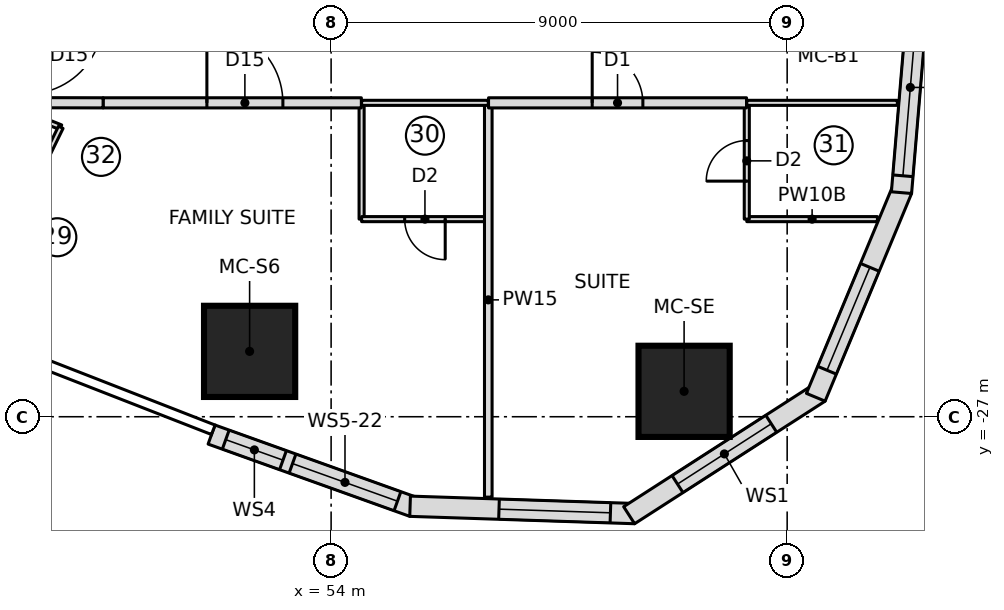
"""IFC4 building model, lengths in metres.
Left out: names, types, materials, properties, quantities, classifications, styles, units other than length and angle.
Written with IfcOpenShell. Run it as: python <this file> out.ifc"""

import sys

from ifc_helpers import new_model, si_unit, direction, frame, frame_2d, origin, origin_2d, place, context, subcontext, project, spatial, polyline, rectangle, outline, extrude, element, fill, save


model = new_model("IFC4")
c1 = context("Model", 3, precision=1e-05, world=origin(), true_north=direction((0.0, 1.0)))
c2 = subcontext(c1, "Body", "Model", "MODEL_VIEW")
j1 = project(units=[si_unit("LENGTHUNIT", "METRE"), si_unit("PLANEANGLEUNIT", "RADIAN")], contexts=[c1])
p1 = place(None, origin())
s1 = spatial("IfcSite", under=j1, at=p1, CompositionType="ELEMENT")
p2 = place(p1, origin())
s2 = spatial("IfcBuilding", under=s1, at=p2, CompositionType="ELEMENT")
p3 = place(p2, frame((0.0, 0.0, 50.25)))
s3 = spatial("IfcBuildingStorey", under=s2, at=p3, CompositionType="ELEMENT", Elevation=50.25)
for number, where, z_axis, x_axis in (
    (1, (52.392, -25.71, 0.0), (0.0, 0.0, 1.0), (1.0, 0.0, 0.0)),
    (2, (60.966, -26.499, 0.0), (0.0, 0.0, 1.0), (1.0, 0.0, 0.0)),
):
    element("IfcColumn", number, at=place(p3, frame(where, z_axis=z_axis, x_axis=x_axis)), inside=s3, PredefinedType="COLUMN", context=c2, shape_type="SweptSolid", body=[
        extrude(rectangle(XDim=1.8, YDim=1.8, at=origin_2d()), origin(), (0.0, 0.0, 1.0), 3.55),
    ])
p4 = place(p3, frame((51.64, -27.352, 0.0), z_axis=(0.0, 0.0, 1.0), x_axis=(0.941339752885, -0.337460323057, 0.0)))
e3 = element("IfcWall", 3, at=p4, inside=s3, PredefinedType="NOTDEFINED", context=c2, shape_type="SweptSolid", body=[
    extrude(outline(polyline([(0.0, -0.2), (4.228, -0.2), (4.165, 0.2), (0.0, 0.2), (0.0, -0.2)])), origin(), (0.0, 0.0, 1.0), 3.25),
])
p5 = place(p4, frame((0.298, 0.0, 0.9)))
e4 = element("IfcOpeningElement", 4, at=p5, cuts=e3, PredefinedType="OPENING", context=c2, shape_type="SweptSolid", body=[
    extrude(rectangle(XDim=1.2, YDim=1.8, at=frame_2d((0.6, 0.9))), frame((0.0, 0.21, 0.0), z_axis=(0.0, -1.0, 0.0), x_axis=(1.0, 0.0, 0.0)), (0.0, 0.0, 1.0), 0.42),
])
p6 = place(p4, frame((1.698, 0.0, 0.9)))
e5 = element("IfcOpeningElement", 5, at=p6, cuts=e3, PredefinedType="OPENING", context=c2, shape_type="SweptSolid", body=[
    extrude(rectangle(XDim=2.2, YDim=1.8, at=frame_2d((1.1, 0.9))), frame((0.0, 0.21, 0.0), z_axis=(0.0, -1.0, 0.0), x_axis=(1.0, 0.0, 0.0)), (0.0, 0.0, 1.0), 0.42),
])
p7 = place(p3, frame((55.59, -28.768, 0.0), z_axis=(0.0, 0.0, 1.0), x_axis=(0.999463576228, -0.032749958686, 0.0)))
e6 = element("IfcWall", 6, at=p7, inside=s3, PredefinedType="NOTDEFINED", context=c2, shape_type="SweptSolid", body=[
    extrude(outline(polyline([(-0.031, -0.2), (4.409, -0.2), (4.284, 0.2), (0.031, 0.2), (-0.031, -0.2)])), origin(), (0.0, 0.0, 1.0), 3.25),
])
p8 = place(p7, frame((1.724, 0.0, 0.6)))
e7 = element("IfcOpeningElement", 7, at=p8, cuts=e6, PredefinedType="OPENING", context=c2, shape_type="SweptSolid", body=[
    extrude(outline(polyline([(0.0, 1.35), (0.084, 1.771), (0.322, 2.128), (0.679, 2.366), (1.1, 2.45), (1.521, 2.366), (1.878, 2.128), (2.116, 1.771), (2.2, 1.35), (2.2, 1.1), (2.116, 0.679), (1.878, 0.322), (1.521, 0.084), (1.1, 0.0), (0.679, 0.084), (0.322, 0.322), (0.084, 0.679), (0.0, 1.1), (0.0, 1.35)])), frame((0.0, 0.21, 0.0), z_axis=(0.0, -1.0, 0.0), x_axis=(1.0, 0.0, 0.0)), (0.0, 0.0, 1.0), 0.42),
])
p9 = place(p3, frame((59.934, -28.91, 0.0), z_axis=(0.0, 0.0, 1.0), x_axis=(0.840937468718, 0.541132307025, 0.0)))
e8 = element("IfcWall", 8, at=p9, inside=s3, PredefinedType="NOTDEFINED", context=c2, shape_type="SweptSolid", body=[
    extrude(outline(polyline([(-0.062, -0.2), (4.409, -0.2), (4.284, 0.2), (0.062, 0.2), (-0.062, -0.2)])), origin(), (0.0, 0.0, 1.0), 3.25),
])
p10 = place(p9, frame((1.073, 0.0, 0.6)))
e9 = element("IfcOpeningElement", 9, at=p10, cuts=e8, PredefinedType="OPENING", context=c2, shape_type="SweptSolid", body=[
    extrude(outline(polyline([(0.0, 1.35), (0.084, 1.771), (0.322, 2.128), (0.679, 2.366), (1.1, 2.45), (1.521, 2.366), (1.878, 2.128), (2.116, 1.771), (2.2, 1.35), (2.2, 1.1), (2.116, 0.679), (1.878, 0.322), (1.521, 0.084), (1.1, 0.0), (0.679, 0.084), (0.322, 0.322), (0.084, 0.679), (0.0, 1.1), (0.0, 1.35)])), frame((0.0, 0.21, 0.0), z_axis=(0.0, -1.0, 0.0), x_axis=(1.0, 0.0, 0.0)), (0.0, 0.0, 1.0), 0.42),
])
p11 = place(p3, frame((63.588, -26.558, 0.0), z_axis=(0.0, 0.0, 1.0), x_axis=(0.384372042685, 0.923178277908, 0.0)))
e10 = element("IfcWall", 10, at=p11, inside=s3, PredefinedType="NOTDEFINED", context=c2, shape_type="SweptSolid", body=[
    extrude(outline(polyline([(-0.062, -0.2), (4.377, -0.2), (4.314, 0.2), (0.062, 0.2), (-0.062, -0.2)])), origin(), (0.0, 0.0, 1.0), 3.25),
])
p12 = place(p11, frame((0.515, 0.0, 0.6)))
e11 = element("IfcOpeningElement", 11, at=p12, cuts=e10, PredefinedType="OPENING", context=c2, shape_type="SweptSolid", body=[
    extrude(outline(polyline([(0.0, 1.35), (0.084, 1.771), (0.322, 2.128), (0.679, 2.366), (1.1, 2.45), (1.521, 2.366), (1.878, 2.128), (2.116, 1.771), (2.2, 1.35), (2.2, 1.1), (2.116, 0.679), (1.878, 0.322), (1.521, 0.084), (1.1, 0.0), (0.679, 0.084), (0.322, 0.322), (0.084, 0.679), (0.0, 1.1), (0.0, 1.35)])), frame((0.0, 0.21, 0.0), z_axis=(0.0, -1.0, 0.0), x_axis=(1.0, 0.0, 0.0)), (0.0, 0.0, 1.0), 0.42),
])
p13 = place(p3, frame((65.259, -22.546, 0.0), z_axis=(0.0, 0.0, 1.0), x_axis=(0.083793550906, 0.996483136248, 0.0)))
e12 = element("IfcWall", 12, at=p13, inside=s3, PredefinedType="NOTDEFINED", context=c2, shape_type="SweptSolid", body=[
    extrude(outline(polyline([(-0.031, -0.2), (4.107, -0.2), (4.104, 0.2), (0.031, 0.2), (-0.031, -0.2)])), origin(), (0.0, 0.0, 1.0), 3.25),
])
p14 = place(p13, frame((0.302, 0.0, 0.9)))
e13 = element("IfcOpeningElement", 13, at=p14, cuts=e12, PredefinedType="OPENING", context=c2, shape_type="SweptSolid", body=[
    extrude(rectangle(XDim=3.5, YDim=1.8, at=frame_2d((1.75, 0.9))), frame((0.0, 0.21, 0.0), z_axis=(0.0, -1.0, 0.0), x_axis=(1.0, 0.0, 0.0)), (0.0, 0.0, 1.0), 0.42),
])
p15 = place(p3, frame((54.602, -23.1, 0.0), z_axis=(0.0, 0.0, 1.0), x_axis=(0.0, 1.0, 0.0)))
e14 = element("IfcWall", 14, at=p15, inside=s3, PredefinedType="PARTITIONING", context=c2, shape_type="SweptSolid", body=[
    extrude(rectangle(XDim=2.3, YDim=0.1, at=frame_2d((1.15, 0.0))), origin(), (0.0, 0.0, 1.0), 3.25),
])
p16 = place(p3, frame((57.102, -23.1, 0.0), z_axis=(0.0, 0.0, 1.0), x_axis=(-1.0, 0.0, 0.0)))
e15 = element("IfcWall", 15, at=p16, inside=s3, PredefinedType="PARTITIONING", context=c2, shape_type="SweptSolid", body=[
    extrude(rectangle(XDim=2.5, YDim=0.1, at=frame_2d((1.25, 0.0))), origin(), (0.0, 0.0, 1.0), 3.25),
])
p17 = place(p16, frame((0.85, 0.0, 0.0)))
e16 = element("IfcOpeningElement", 16, at=p17, cuts=e15, PredefinedType="OPENING", context=c2, shape_type="SweptSolid", body=[
    extrude(rectangle(XDim=0.8, YDim=2.1, at=frame_2d((0.4, 1.05))), frame((0.0, 0.06, 0.0), z_axis=(0.0, -1.0, 0.0), x_axis=(1.0, 0.0, 0.0)), (0.0, 0.0, 1.0), 0.12),
])
p18 = place(p3, frame((64.781, -23.1, 0.0), z_axis=(0.0, 0.0, 1.0), x_axis=(-1.0, 0.0, 0.0)))
e17 = element("IfcWall", 17, at=p18, inside=s3, PredefinedType="PARTITIONING", context=c2, shape_type="SweptSolid", body=[
    extrude(rectangle(XDim=2.578, YDim=0.1, at=frame_2d((1.289, 0.0))), origin(), (0.0, 0.0, 1.0), 3.25),
])
p19 = place(p3, frame((62.203, -23.1, 0.0), z_axis=(0.0, 0.0, 1.0), x_axis=(0.0, 1.0, 0.0)))
e18 = element("IfcWall", 18, at=p19, inside=s3, PredefinedType="PARTITIONING", context=c2, shape_type="SweptSolid", body=[
    extrude(rectangle(XDim=2.3, YDim=0.1, at=frame_2d((1.15, 0.0))), origin(), (0.0, 0.0, 1.0), 3.25),
])
p20 = place(p19, frame((0.75, 0.0, 0.0)))
e19 = element("IfcOpeningElement", 19, at=p20, cuts=e18, PredefinedType="OPENING", context=c2, shape_type="SweptSolid", body=[
    extrude(rectangle(XDim=0.8, YDim=2.1, at=frame_2d((0.4, 1.05))), frame((0.0, 0.06, 0.0), z_axis=(0.0, -1.0, 0.0), x_axis=(1.0, 0.0, 0.0)), (0.0, 0.0, 1.0), 0.12),
])
p21 = place(p3, frame((57.102, -28.587, 0.0), z_axis=(0.0, 0.0, 1.0), x_axis=(0.0, 1.0, 0.0)))
e20 = element("IfcWall", 20, at=p21, inside=s3, PredefinedType="PARTITIONING", context=c2, shape_type="SweptSolid", body=[
    extrude(rectangle(XDim=7.787, YDim=0.15, at=frame_2d((3.894, 0.0))), origin(), (0.0, 0.0, 1.0), 3.25),
])
p22 = place(p3, frame((46.338, -20.355, 0.0), z_axis=(0.0, 0.0, 1.0), x_axis=(0.928288495333, -0.371860819975, 0.0)))
e21 = element("IfcWall", 21, at=p22, inside=s3, PredefinedType="PARTITIONING", context=c2, shape_type="SweptSolid", body=[
    extrude(rectangle(XDim=2.507, YDim=0.1, at=frame_2d((1.253, 0.0))), origin(), (0.0, 0.0, 1.0), 3.25),
])
p23 = place(p22, frame((0.45, 0.0, 0.0)))
e22 = element("IfcOpeningElement", 22, at=p23, cuts=e21, PredefinedType="OPENING", context=c2, shape_type="SweptSolid", body=[
    extrude(rectangle(XDim=0.8, YDim=2.1, at=frame_2d((0.4, 1.05))), frame((0.0, 0.06, 0.0), z_axis=(0.0, -1.0, 0.0), x_axis=(1.0, 0.0, 0.0)), (0.0, 0.0, 1.0), 0.12),
])
p24 = place(p3, frame((48.665, -21.288, 0.0), z_axis=(0.0, 0.0, 1.0), x_axis=(-0.438171240168, -0.898891519756, 0.0)))
e23 = element("IfcWall", 23, at=p24, inside=s3, PredefinedType="PARTITIONING", context=c2, shape_type="SweptSolid", body=[
    extrude(rectangle(XDim=2.306, YDim=0.1, at=frame_2d((1.153, 0.0))), origin(), (0.0, 0.0, 1.0), 3.25),
])
p25 = place(p3, frame((49.5, -20.805, 0.0), z_axis=(0.0, 0.0, 1.0), x_axis=(1.0, 0.0, 0.0)))
e24 = element("IfcWall", 24, at=p25, inside=s3, PredefinedType="PARTITIONING", context=c2, shape_type="SweptSolid", body=[
    extrude(rectangle(XDim=5.097, YDim=0.2, at=frame_2d((2.548, 0.0))), origin(), (0.0, 0.0, 1.0), 3.25),
])
p26 = place(p25, frame((2.048, 0.0, 0.0)))
e25 = element("IfcOpeningElement", 25, at=p26, cuts=e24, PredefinedType="OPENING", context=c2, shape_type="SweptSolid", body=[
    extrude(rectangle(XDim=1.5, YDim=2.1, at=frame_2d((0.75, 1.05))), frame((0.0, 0.11, 0.0), z_axis=(0.0, -1.0, 0.0), x_axis=(1.0, 0.0, 0.0)), (0.0, 0.0, 1.0), 0.22),
])
p27 = place(p3, frame((57.107, -20.805, 0.0), z_axis=(0.0, 0.0, 1.0), x_axis=(1.0, 0.0, 0.0)))
e26 = element("IfcWall", 26, at=p27, inside=s3, PredefinedType="PARTITIONING", context=c2, shape_type="SweptSolid", body=[
    extrude(rectangle(XDim=5.092, YDim=0.2, at=frame_2d((2.546, 0.0))), origin(), (0.0, 0.0, 1.0), 3.25),
])
p28 = place(p27, frame((2.046, 0.0, 0.0)))
e27 = element("IfcOpeningElement", 27, at=p28, cuts=e26, PredefinedType="OPENING", context=c2, shape_type="SweptSolid", body=[
    extrude(rectangle(XDim=1.0, YDim=2.1, at=frame_2d((0.5, 1.05))), frame((0.0, 0.11, 0.0), z_axis=(0.0, -1.0, 0.0), x_axis=(1.0, 0.0, 0.0)), (0.0, 0.0, 1.0), 0.22),
])
p29 = place(p3, frame((54.602, -20.805, 0.0), z_axis=(0.0, 0.0, 1.0), x_axis=(1.0, 0.0, 0.0)))
e28 = element("IfcWall", 28, at=p29, inside=s3, PredefinedType="PARTITIONING", context=c2, shape_type="SweptSolid", body=[
    extrude(rectangle(XDim=2.5, YDim=0.1, at=frame_2d((1.25, 0.0))), origin(), (0.0, 0.0, 1.0), 3.25),
])
p30 = place(p3, frame((62.203, -20.805, 0.0), z_axis=(0.0, 0.0, 1.0), x_axis=(1.0, 0.0, 0.0)))
e29 = element("IfcWall", 29, at=p30, inside=s3, PredefinedType="PARTITIONING", context=c2, shape_type="SweptSolid", body=[
    extrude(rectangle(XDim=2.971, YDim=0.1, at=frame_2d((1.486, 0.0))), origin(), (0.0, 0.0, 1.0), 3.25),
])
p31 = place(p3, frame((47.995, -20.802, 0.0), z_axis=(0.0, 0.0, 1.0), x_axis=(0.999998104399, -0.001947099992, 0.0)))
e30 = element("IfcWall", 30, at=p31, inside=s3, PredefinedType="PARTITIONING", context=c2, shape_type="SweptSolid", body=[
    extrude(rectangle(XDim=1.505, YDim=0.2, at=frame_2d((0.752, 0.0))), origin(), (0.0, 0.0, 1.0), 3.25),
])
p32 = place(p5, origin())
e31 = element("IfcWindow", 31, at=p32, inside=s3, PartitioningType="SINGLE_PANEL", PredefinedType="WINDOW", context=c2, shape_type="SweptSolid", body=[
    extrude(rectangle(XDim=1.2, YDim=1.8, at=frame_2d((0.6, 0.9))), frame((0.0, 0.17, 0.0), z_axis=(0.0, -1.0, 0.0), x_axis=(1.0, 0.0, 0.0)), (0.0, 0.0, 1.0), 0.06),
])
fill(e4, e31)
p33 = place(p6, origin())
e32 = element("IfcWindow", 32, at=p33, inside=s3, PartitioningType="SINGLE_PANEL", PredefinedType="WINDOW", context=c2, shape_type="SweptSolid", body=[
    extrude(rectangle(XDim=2.2, YDim=1.8, at=frame_2d((1.1, 0.9))), frame((0.0, 0.17, 0.0), z_axis=(0.0, -1.0, 0.0), x_axis=(1.0, 0.0, 0.0)), (0.0, 0.0, 1.0), 0.06),
])
fill(e5, e32)
p34 = place(p8, origin())
e33 = element("IfcWindow", 33, at=p34, inside=s3, PartitioningType="SINGLE_PANEL", PredefinedType="WINDOW", context=c2, shape_type="SweptSolid", body=[
    extrude(outline(polyline([(0.0, 1.35), (0.084, 1.771), (0.322, 2.128), (0.679, 2.366), (1.1, 2.45), (1.521, 2.366), (1.878, 2.128), (2.116, 1.771), (2.2, 1.35), (2.2, 1.1), (2.116, 0.679), (1.878, 0.322), (1.521, 0.084), (1.1, 0.0), (0.679, 0.084), (0.322, 0.322), (0.084, 0.679), (0.0, 1.1), (0.0, 1.35)])), frame((0.0, 0.17, 0.0), z_axis=(0.0, -1.0, 0.0), x_axis=(1.0, 0.0, 0.0)), (0.0, 0.0, 1.0), 0.06),
])
fill(e7, e33)
p35 = place(p10, origin())
e34 = element("IfcWindow", 34, at=p35, inside=s3, PartitioningType="SINGLE_PANEL", PredefinedType="WINDOW", context=c2, shape_type="SweptSolid", body=[
    extrude(outline(polyline([(0.0, 1.35), (0.084, 1.771), (0.322, 2.128), (0.679, 2.366), (1.1, 2.45), (1.521, 2.366), (1.878, 2.128), (2.116, 1.771), (2.2, 1.35), (2.2, 1.1), (2.116, 0.679), (1.878, 0.322), (1.521, 0.084), (1.1, 0.0), (0.679, 0.084), (0.322, 0.322), (0.084, 0.679), (0.0, 1.1), (0.0, 1.35)])), frame((0.0, 0.17, 0.0), z_axis=(0.0, -1.0, 0.0), x_axis=(1.0, 0.0, 0.0)), (0.0, 0.0, 1.0), 0.06),
])
fill(e9, e34)
p36 = place(p12, origin())
e35 = element("IfcWindow", 35, at=p36, inside=s3, PartitioningType="SINGLE_PANEL", PredefinedType="WINDOW", context=c2, shape_type="SweptSolid", body=[
    extrude(outline(polyline([(0.0, 1.35), (0.084, 1.771), (0.322, 2.128), (0.679, 2.366), (1.1, 2.45), (1.521, 2.366), (1.878, 2.128), (2.116, 1.771), (2.2, 1.35), (2.2, 1.1), (2.116, 0.679), (1.878, 0.322), (1.521, 0.084), (1.1, 0.0), (0.679, 0.084), (0.322, 0.322), (0.084, 0.679), (0.0, 1.1), (0.0, 1.35)])), frame((0.0, 0.17, 0.0), z_axis=(0.0, -1.0, 0.0), x_axis=(1.0, 0.0, 0.0)), (0.0, 0.0, 1.0), 0.06),
])
fill(e11, e35)
p37 = place(p14, origin())
e36 = element("IfcWindow", 36, at=p37, inside=s3, PartitioningType="SINGLE_PANEL", PredefinedType="WINDOW", context=c2, shape_type="SweptSolid", body=[
    extrude(rectangle(XDim=3.5, YDim=1.8, at=frame_2d((1.75, 0.9))), frame((0.0, 0.17, 0.0), z_axis=(0.0, -1.0, 0.0), x_axis=(1.0, 0.0, 0.0)), (0.0, 0.0, 1.0), 0.06),
])
fill(e13, e36)
p38 = place(p17, origin())
e37 = element("IfcDoor", 37, at=p38, inside=s3, OperationType="SINGLE_SWING_LEFT", PredefinedType="DOOR", context=c2, shape_type="SweptSolid", body=[
    extrude(rectangle(XDim=0.8, YDim=2.1, at=frame_2d((0.4, 1.05))), frame((0.0, 0.025, 0.0), z_axis=(0.0, -1.0, 0.0), x_axis=(1.0, 0.0, 0.0)), (0.0, 0.0, 1.0), 0.05),
])
fill(e16, e37)
p39 = place(p20, origin())
e38 = element("IfcDoor", 38, at=p39, inside=s3, OperationType="SINGLE_SWING_LEFT", PredefinedType="DOOR", context=c2, shape_type="SweptSolid", body=[
    extrude(rectangle(XDim=0.8, YDim=2.1, at=frame_2d((0.4, 1.05))), frame((0.0, 0.025, 0.0), z_axis=(0.0, -1.0, 0.0), x_axis=(1.0, 0.0, 0.0)), (0.0, 0.0, 1.0), 0.05),
])
fill(e19, e38)
p40 = place(p26, origin())
e39 = element("IfcDoor", 39, at=p40, inside=s3, OperationType="DOUBLE_DOOR_SINGLE_SWING", PredefinedType="DOOR", context=c2, shape_type="SweptSolid", body=[
    extrude(rectangle(XDim=1.5, YDim=2.1, at=frame_2d((0.75, 1.05))), frame((0.0, 0.025, 0.0), z_axis=(0.0, -1.0, 0.0), x_axis=(1.0, 0.0, 0.0)), (0.0, 0.0, 1.0), 0.05),
])
fill(e25, e39)
p41 = place(p28, origin())
e40 = element("IfcDoor", 40, at=p41, inside=s3, OperationType="SINGLE_SWING_LEFT", PredefinedType="DOOR", context=c2, shape_type="SweptSolid", body=[
    extrude(rectangle(XDim=1.0, YDim=2.1, at=frame_2d((0.5, 1.05))), frame((0.0, 0.025, 0.0), z_axis=(0.0, -1.0, 0.0), x_axis=(1.0, 0.0, 0.0)), (0.0, 0.0, 1.0), 0.05),
])
fill(e27, e40)
save(model, sys.argv[1])
